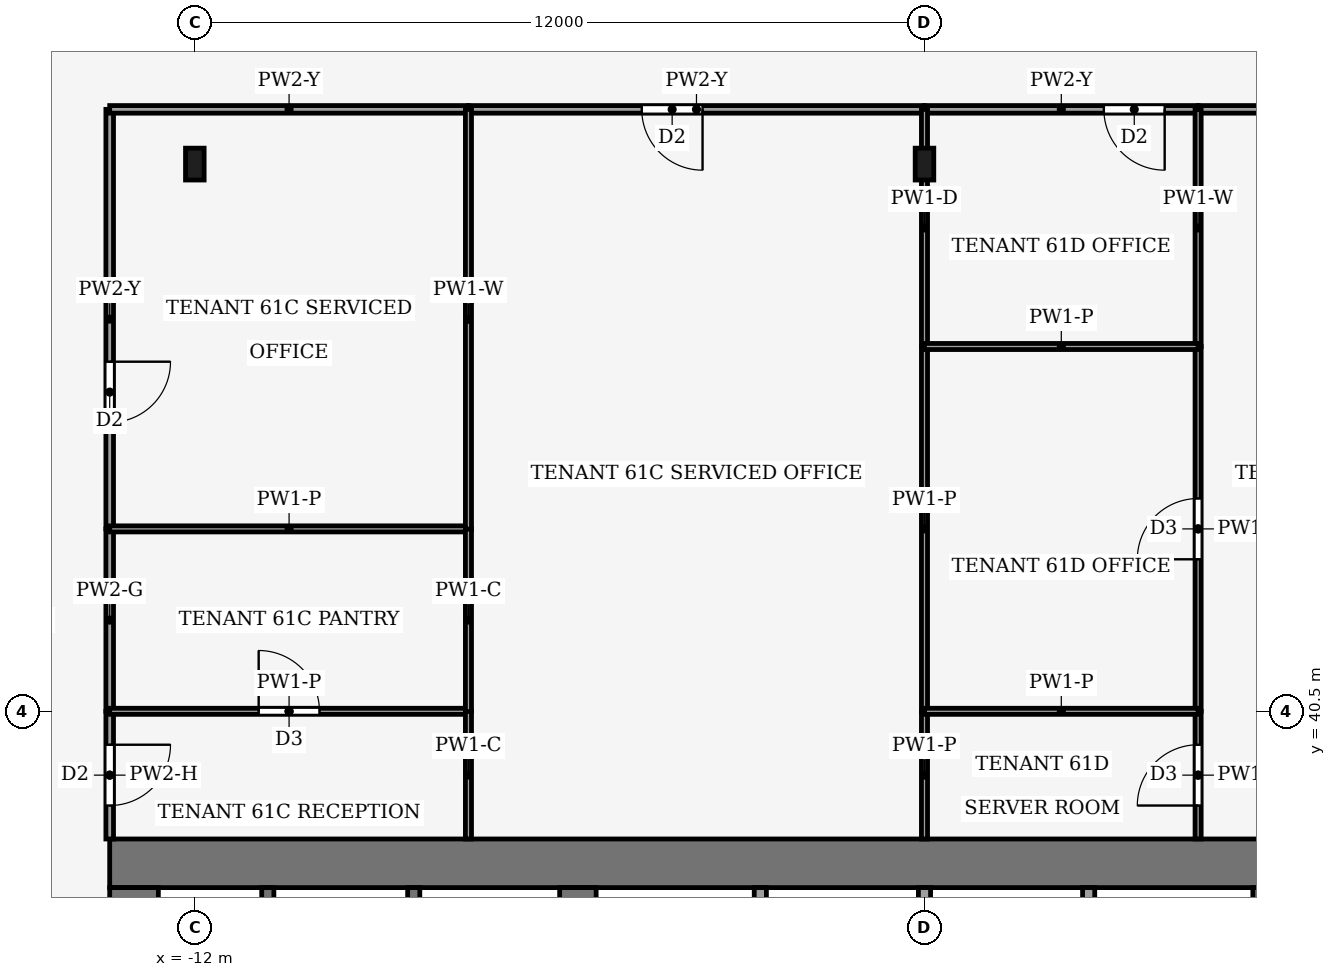
"""IFC4 building model, lengths in metres.
Left out: names, types, materials, properties, quantities, classifications, styles, units other than length and angle.
Written with IfcOpenShell. Run it as: python <this file> out.ifc"""

import sys

from ifc_helpers import new_model, si_unit, direction, frame, frame_2d, origin, origin_2d, place, context, subcontext, project, spatial, rectangle, i_section, extrude, element, fill, save


model = new_model("IFC4")
c1 = context("Model", 3, precision=1e-05, world=origin(), true_north=direction((0.0, 1.0)))
c2 = subcontext(c1, "Body", "Model", "MODEL_VIEW")
j1 = project(units=[si_unit("LENGTHUNIT", "METRE"), si_unit("PLANEANGLEUNIT", "RADIAN")], contexts=[c1])
p1 = place(None, origin())
s1 = spatial("IfcSite", under=j1, at=p1, CompositionType="ELEMENT")
p2 = place(p1, origin())
s2 = spatial("IfcBuilding", under=s1, at=p2, CompositionType="ELEMENT")
p3 = place(p2, frame((0.0, 0.0, 266.0)))
s3 = spatial("IfcBuildingStorey", under=s2, at=p3, CompositionType="ELEMENT", Elevation=266.0)
p4 = place(p3, frame((-13.4, 38.0, -0.13), z_axis=(0.0, 0.0, 1.0), x_axis=(1.0, 0.0, 0.0)))
e1 = element("IfcWall", 1, at=p4, inside=s3, PredefinedType="SHEAR", context=c2, shape_type="SweptSolid", body=[
    extrude(rectangle(XDim=26.8, YDim=0.8, at=frame_2d((13.4, 0.0))), origin(), (0.0, 0.0, 1.0), 4.0),
])
p5 = place(p3, frame((-13.0, 18.4, -0.13), z_axis=(0.0, 0.0, 1.0), x_axis=(0.0, 1.0, 0.0)))
e2 = element("IfcWall", 2, at=p5, inside=s3, PredefinedType="SHEAR", context=c2, shape_type="SweptSolid", body=[
    extrude(rectangle(XDim=19.2, YDim=0.8, at=frame_2d((9.6, 0.0))), origin(), (0.0, 0.0, 1.0), 4.0),
])
p6 = place(p5, frame((2.8, 0.0, 0.13)))
e3 = element("IfcOpeningElement", 3, at=p6, cuts=e2, PredefinedType="OPENING", context=c2, shape_type="SweptSolid", body=[
    extrude(rectangle(XDim=2.4, YDim=2.4, at=frame_2d((1.2, 1.2))), frame((0.0, 0.41, 0.0), z_axis=(0.0, -1.0, 0.0), x_axis=(1.0, 0.0, 0.0)), (0.0, 0.0, 1.0), 0.82),
])
p7 = place(p5, frame((13.4, 0.0, 0.13)))
e4 = element("IfcOpeningElement", 4, at=p7, cuts=e2, PredefinedType="OPENING", context=c2, shape_type="SweptSolid", body=[
    extrude(rectangle(XDim=1.4, YDim=2.2, at=frame_2d((0.7, 1.1))), frame((0.0, 0.41, 0.0), z_axis=(0.0, -1.0, 0.0), x_axis=(1.0, 0.0, 0.0)), (0.0, 0.0, 1.0), 0.82),
])
p8 = place(p3, frame((-5.7, 18.4, -0.13), z_axis=(0.0, 0.0, 1.0), x_axis=(0.0, 1.0, 0.0)))
e5 = element("IfcWall", 5, at=p8, inside=s3, PredefinedType="SHEAR", context=c2, shape_type="SweptSolid", body=[
    extrude(rectangle(XDim=19.2, YDim=0.6, at=frame_2d((9.6, 0.0))), origin(), (0.0, 0.0, 1.0), 4.0),
])
p9 = place(p8, frame((8.35, 0.0, 0.13)))
e6 = element("IfcOpeningElement", 6, at=p9, cuts=e5, PredefinedType="OPENING", context=c2, shape_type="SweptSolid", body=[
    extrude(rectangle(XDim=0.9, YDim=2.1, at=frame_2d((0.45, 1.05))), frame((0.0, 0.31, 0.0), z_axis=(0.0, -1.0, 0.0), x_axis=(1.0, 0.0, 0.0)), (0.0, 0.0, 1.0), 0.62),
])
p10 = place(p3, frame((5.7, 18.4, -0.13), z_axis=(0.0, 0.0, 1.0), x_axis=(0.0, 1.0, 0.0)))
e7 = element("IfcWall", 7, at=p10, inside=s3, PredefinedType="SHEAR", context=c2, shape_type="SweptSolid", body=[
    extrude(rectangle(XDim=19.2, YDim=0.6, at=frame_2d((9.6, 0.0))), origin(), (0.0, 0.0, 1.0), 4.0),
])
p11 = place(p10, frame((13.3, 0.0, 0.13)))
e8 = element("IfcOpeningElement", 8, at=p11, cuts=e7, PredefinedType="OPENING", context=c2, shape_type="SweptSolid", body=[
    extrude(rectangle(XDim=2.4, YDim=2.4, at=frame_2d((1.2, 1.2))), frame((0.0, 0.31, 0.0), z_axis=(0.0, -1.0, 0.0), x_axis=(1.0, 0.0, 0.0)), (0.0, 0.0, 1.0), 0.62),
])
for number, where, z_axis, x_axis in (
    (9, (-12.0, 49.5, 0.0), (0.0, 0.0, 1.0), (1.0, 0.0, 0.0)),
    (10, (0.0, 49.5, 0.0), (0.0, 0.0, 1.0), (1.0, 0.0, 0.0)),
):
    element("IfcColumn", number, at=place(p3, frame(where, z_axis=z_axis, x_axis=x_axis)), inside=s3, PredefinedType="COLUMN", context=c2, shape_type="SweptSolid", body=[
        extrude(i_section(OverallWidth=0.306, OverallDepth=0.524, WebThickness=0.012, FlangeThickness=0.04, FilletRadius=0.027, at=origin_2d()), origin(), (0.0, 0.0, 1.0), 4.0),
    ])
for number, where, z_axis, x_axis in (
    (11, (-10.8, 34.0, 0.0), (0.0, 0.0, 1.0), (0.0, 1.0, 0.0)),
    (12, (-8.4, 34.0, 0.0), (0.0, 0.0, 1.0), (0.0, 1.0, 0.0)),
    (13, (-2.7, 34.0, 0.0), (0.0, 0.0, 1.0), (0.0, 1.0, 0.0)),
    (14, (0.0, 34.0, 0.0), (0.0, 0.0, 1.0), (0.0, 1.0, 0.0)),
    (15, (2.7, 34.0, 0.0), (0.0, 0.0, 1.0), (0.0, 1.0, 0.0)),
):
    element("IfcWall", number, at=place(p3, frame(where, z_axis=z_axis, x_axis=x_axis)), inside=s3, PredefinedType="PARTITIONING", context=c2, shape_type="SweptSolid", body=[
        extrude(rectangle(XDim=3.6, YDim=0.2, at=frame_2d((1.8, 0.0))), origin(), (0.0, 0.0, 1.0), 3.87),
    ])
p12 = place(p3, frame((-13.4, 40.5, 0.0), z_axis=(0.0, 0.0, 1.0), x_axis=(0.0, -1.0, 0.0)))
e16 = element("IfcWall", 16, at=p12, inside=s3, PredefinedType="PARTITIONING", context=c2, shape_type="SweptSolid", body=[
    extrude(rectangle(XDim=2.1, YDim=0.125, at=frame_2d((1.05, 0.0))), origin(), (0.0, 0.0, 1.0), 3.14),
])
p13 = place(p12, frame((0.55, 0.0, 0.0)))
e17 = element("IfcOpeningElement", 17, at=p13, cuts=e16, PredefinedType="OPENING", context=c2, shape_type="SweptSolid", body=[
    extrude(rectangle(XDim=1.0, YDim=2.1, at=frame_2d((0.5, 1.05))), frame((0.0, 0.073, 0.0), z_axis=(0.0, -1.0, 0.0), x_axis=(1.0, 0.0, 0.0)), (0.0, 0.0, 1.0), 0.145),
])
p14 = place(p3, frame((-13.4, 40.5, 0.0), z_axis=(0.0, 0.0, 1.0), x_axis=(0.0, 1.0, 0.0)))
e18 = element("IfcWall", 18, at=p14, inside=s3, PredefinedType="PARTITIONING", context=c2, shape_type="SweptSolid", body=[
    extrude(rectangle(XDim=3.0, YDim=0.125, at=frame_2d((1.5, 0.0))), origin(), (0.0, 0.0, 1.0), 3.87),
])
p15 = place(p3, frame((-13.4, 50.4, 0.0), z_axis=(0.0, 0.0, 1.0), x_axis=(0.0, -1.0, 0.0)))
e19 = element("IfcWall", 19, at=p15, inside=s3, PredefinedType="PARTITIONING", context=c2, shape_type="SweptSolid", body=[
    extrude(rectangle(XDim=6.9, YDim=0.125, at=frame_2d((3.45, 0.0))), origin(), (0.0, 0.0, 1.0), 3.24),
])
p16 = place(p15, frame((4.15, 0.0, 0.0)))
e20 = element("IfcOpeningElement", 20, at=p16, cuts=e19, PredefinedType="OPENING", context=c2, shape_type="SweptSolid", body=[
    extrude(rectangle(XDim=1.0, YDim=2.1, at=frame_2d((0.5, 1.05))), frame((0.0, 0.073, 0.0), z_axis=(0.0, -1.0, 0.0), x_axis=(1.0, 0.0, 0.0)), (0.0, 0.0, 1.0), 0.145),
])
p17 = place(p3, frame((-7.5, 50.4, 0.0), z_axis=(0.0, 0.0, 1.0), x_axis=(-1.0, 0.0, 0.0)))
e21 = element("IfcWall", 21, at=p17, inside=s3, PredefinedType="PARTITIONING", context=c2, shape_type="SweptSolid", body=[
    extrude(rectangle(XDim=5.9, YDim=0.125, at=frame_2d((2.95, 0.0))), origin(), (0.0, 0.0, 1.0), 3.24),
])
p18 = place(p3, frame((0.0, 50.4, 0.0), z_axis=(0.0, 0.0, 1.0), x_axis=(-1.0, 0.0, 0.0)))
e22 = element("IfcWall", 22, at=p18, inside=s3, PredefinedType="PARTITIONING", context=c2, shape_type="SweptSolid", body=[
    extrude(rectangle(XDim=7.5, YDim=0.125, at=frame_2d((3.75, 0.0))), origin(), (0.0, 0.0, 1.0), 3.24),
])
p19 = place(p18, frame((3.65, 0.0, 0.0)))
e23 = element("IfcOpeningElement", 23, at=p19, cuts=e22, PredefinedType="OPENING", context=c2, shape_type="SweptSolid", body=[
    extrude(rectangle(XDim=1.0, YDim=2.1, at=frame_2d((0.5, 1.05))), frame((0.0, 0.073, 0.0), z_axis=(0.0, -1.0, 0.0), x_axis=(1.0, 0.0, 0.0)), (0.0, 0.0, 1.0), 0.145),
])
p20 = place(p3, frame((10.4, 50.4, 0.0), z_axis=(0.0, 0.0, 1.0), x_axis=(-1.0, 0.0, 0.0)))
e24 = element("IfcWall", 24, at=p20, inside=s3, PredefinedType="PARTITIONING", context=c2, shape_type="SweptSolid", body=[
    extrude(rectangle(XDim=5.9, YDim=0.125, at=frame_2d((2.95, 0.0))), origin(), (0.0, 0.0, 1.0), 3.24),
])
p21 = place(p20, frame((2.45, 0.0, 0.0)))
e25 = element("IfcOpeningElement", 25, at=p21, cuts=e24, PredefinedType="OPENING", context=c2, shape_type="SweptSolid", body=[
    extrude(rectangle(XDim=1.0, YDim=2.1, at=frame_2d((0.5, 1.05))), frame((0.0, 0.073, 0.0), z_axis=(0.0, -1.0, 0.0), x_axis=(1.0, 0.0, 0.0)), (0.0, 0.0, 1.0), 0.145),
])
p22 = place(p3, frame((4.5, 50.4, 0.0), z_axis=(0.0, 0.0, 1.0), x_axis=(-1.0, 0.0, 0.0)))
e26 = element("IfcWall", 26, at=p22, inside=s3, PredefinedType="PARTITIONING", context=c2, shape_type="SweptSolid", body=[
    extrude(rectangle(XDim=4.5, YDim=0.125, at=frame_2d((2.25, 0.0))), origin(), (0.0, 0.0, 1.0), 3.24),
])
p23 = place(p22, frame((0.55, 0.0, 0.0)))
e27 = element("IfcOpeningElement", 27, at=p23, cuts=e26, PredefinedType="OPENING", context=c2, shape_type="SweptSolid", body=[
    extrude(rectangle(XDim=1.0, YDim=2.1, at=frame_2d((0.5, 1.05))), frame((0.0, 0.073, 0.0), z_axis=(0.0, -1.0, 0.0), x_axis=(1.0, 0.0, 0.0)), (0.0, 0.0, 1.0), 0.145),
])
p24 = place(p3, frame((-13.4, 40.5, 0.0), z_axis=(0.0, 0.0, 1.0), x_axis=(1.0, 0.0, 0.0)))
e28 = element("IfcWall", 28, at=p24, inside=s3, PredefinedType="PARTITIONING", context=c2, shape_type="SweptSolid", body=[
    extrude(rectangle(XDim=5.9, YDim=0.1, at=frame_2d((2.95, 0.0))), origin(), (0.0, 0.0, 1.0), 3.44),
])
p25 = place(p24, frame((2.45, 0.0, 0.0)))
e29 = element("IfcOpeningElement", 29, at=p25, cuts=e28, PredefinedType="OPENING", context=c2, shape_type="SweptSolid", body=[
    extrude(rectangle(XDim=1.0, YDim=2.1, at=frame_2d((0.5, 1.05))), frame((0.0, 0.06, 0.0), z_axis=(0.0, -1.0, 0.0), x_axis=(1.0, 0.0, 0.0)), (0.0, 0.0, 1.0), 0.12),
])
p26 = place(p3, frame((-7.5, 38.4, 0.0), z_axis=(0.0, 0.0, 1.0), x_axis=(0.0, 1.0, 0.0)))
e30 = element("IfcWall", 30, at=p26, inside=s3, PredefinedType="PARTITIONING", context=c2, shape_type="SweptSolid", body=[
    extrude(rectangle(XDim=2.104, YDim=0.1, at=frame_2d((1.052, 0.0))), origin(), (0.0, 0.0, 1.0), 3.87),
])
p27 = place(p3, frame((-7.5, 43.5, 0.0), z_axis=(0.0, 0.0, 1.0), x_axis=(-1.0, 0.0, 0.0)))
e31 = element("IfcWall", 31, at=p27, inside=s3, PredefinedType="PARTITIONING", context=c2, shape_type="SweptSolid", body=[
    extrude(rectangle(XDim=5.9, YDim=0.1, at=frame_2d((2.95, 0.0))), origin(), (0.0, 0.0, 1.0), 3.44),
])
p28 = place(p3, frame((-7.5, 40.496, 0.0), z_axis=(0.0, 0.0, 1.0), x_axis=(0.0, 1.0, 0.0)))
e32 = element("IfcWall", 32, at=p28, inside=s3, PredefinedType="PARTITIONING", context=c2, shape_type="SweptSolid", body=[
    extrude(rectangle(XDim=3.008, YDim=0.1, at=frame_2d((1.504, 0.0))), origin(), (0.0, 0.0, 1.0), 3.87),
])
p29 = place(p3, frame((-7.5, 43.496, 0.0), z_axis=(0.0, 0.0, 1.0), x_axis=(0.0, 1.0, 0.0)))
e33 = element("IfcWall", 33, at=p29, inside=s3, PredefinedType="PARTITIONING", context=c2, shape_type="SweptSolid", body=[
    extrude(rectangle(XDim=6.904, YDim=0.1, at=frame_2d((3.452, 0.0))), origin(), (0.0, 0.0, 1.0), 3.24),
])
p30 = place(p3, frame((0.0, 38.4, 0.0), z_axis=(0.0, 0.0, 1.0), x_axis=(0.0, 1.0, 0.0)))
e34 = element("IfcWall", 34, at=p30, inside=s3, PredefinedType="PARTITIONING", context=c2, shape_type="SweptSolid", body=[
    extrude(rectangle(XDim=2.1, YDim=0.1, at=frame_2d((1.05, 0.0))), origin(), (0.0, 0.0, 1.0), 3.44),
])
p31 = place(p3, frame((0.0, 40.5, 0.0), z_axis=(0.0, 0.0, 1.0), x_axis=(0.0, 1.0, 0.0)))
e35 = element("IfcWall", 35, at=p31, inside=s3, PredefinedType="PARTITIONING", context=c2, shape_type="SweptSolid", body=[
    extrude(rectangle(XDim=6.0, YDim=0.1, at=frame_2d((3.0, 0.0))), origin(), (0.0, 0.0, 1.0), 3.44),
])
p32 = place(p3, frame((0.0, 46.5, 0.0), z_axis=(0.0, 0.0, 1.0), x_axis=(0.0, 1.0, 0.0)))
e36 = element("IfcWall", 36, at=p32, inside=s3, PredefinedType="PARTITIONING", context=c2, shape_type="SweptSolid", body=[
    extrude(rectangle(XDim=3.9, YDim=0.1, at=frame_2d((1.95, 0.0))), origin(), (0.0, 0.0, 1.0), 3.29),
])
p33 = place(p3, frame((4.5, 38.4, 0.0), z_axis=(0.0, 0.0, 1.0), x_axis=(0.0, 1.0, 0.0)))
e37 = element("IfcWall", 37, at=p33, inside=s3, PredefinedType="PARTITIONING", context=c2, shape_type="SweptSolid", body=[
    extrude(rectangle(XDim=2.1, YDim=0.1, at=frame_2d((1.05, 0.0))), origin(), (0.0, 0.0, 1.0), 3.87),
])
p34 = place(p33, frame((0.55, 0.0, 0.0)))
e38 = element("IfcOpeningElement", 38, at=p34, cuts=e37, PredefinedType="OPENING", context=c2, shape_type="SweptSolid", body=[
    extrude(rectangle(XDim=1.0, YDim=2.1, at=frame_2d((0.5, 1.05))), frame((0.0, 0.06, 0.0), z_axis=(0.0, -1.0, 0.0), x_axis=(1.0, 0.0, 0.0)), (0.0, 0.0, 1.0), 0.12),
])
p35 = place(p3, frame((4.5, 40.5, 0.0), z_axis=(0.0, 0.0, 1.0), x_axis=(0.0, 1.0, 0.0)))
e39 = element("IfcWall", 39, at=p35, inside=s3, PredefinedType="PARTITIONING", context=c2, shape_type="SweptSolid", body=[
    extrude(rectangle(XDim=6.0, YDim=0.1, at=frame_2d((3.0, 0.0))), origin(), (0.0, 0.0, 1.0), 3.87),
])
p36 = place(p35, frame((2.5, 0.0, 0.0)))
e40 = element("IfcOpeningElement", 40, at=p36, cuts=e39, PredefinedType="OPENING", context=c2, shape_type="SweptSolid", body=[
    extrude(rectangle(XDim=1.0, YDim=2.1, at=frame_2d((0.5, 1.05))), frame((0.0, 0.06, 0.0), z_axis=(0.0, -1.0, 0.0), x_axis=(1.0, 0.0, 0.0)), (0.0, 0.0, 1.0), 0.12),
])
p37 = place(p3, frame((4.5, 50.4, 0.0), z_axis=(0.0, 0.0, 1.0), x_axis=(0.0, -1.0, 0.0)))
e41 = element("IfcWall", 41, at=p37, inside=s3, PredefinedType="PARTITIONING", context=c2, shape_type="SweptSolid", body=[
    extrude(rectangle(XDim=3.9, YDim=0.1, at=frame_2d((1.95, 0.0))), origin(), (0.0, 0.0, 1.0), 3.24),
])
for number, where, z_axis, x_axis in (
    (42, (4.5, 40.5, 0.0), (0.0, 0.0, 1.0), (-1.0, 0.0, 0.0)),
    (43, (4.5, 46.5, 0.0), (0.0, 0.0, 1.0), (-1.0, 0.0, 0.0)),
):
    element("IfcWall", number, at=place(p3, frame(where, z_axis=z_axis, x_axis=x_axis)), inside=s3, PredefinedType="PARTITIONING", context=c2, shape_type="SweptSolid", body=[
        extrude(rectangle(XDim=4.5, YDim=0.1, at=frame_2d((2.25, 0.0))), origin(), (0.0, 0.0, 1.0), 3.44),
    ])
p38 = place(p13, origin())
e44 = element("IfcDoor", 44, at=p38, inside=s3, OperationType="SINGLE_SWING_RIGHT", PredefinedType="DOOR", context=c2, shape_type="SweptSolid", body=[
    extrude(rectangle(XDim=1.0, YDim=2.1, at=frame_2d((0.5, 1.05))), frame((0.0, 0.025, 0.0), z_axis=(0.0, -1.0, 0.0), x_axis=(1.0, 0.0, 0.0)), (0.0, 0.0, 1.0), 0.05),
])
fill(e17, e44)
p39 = place(p16, origin())
e45 = element("IfcDoor", 45, at=p39, inside=s3, OperationType="SINGLE_SWING_RIGHT", PredefinedType="DOOR", context=c2, shape_type="SweptSolid", body=[
    extrude(rectangle(XDim=1.0, YDim=2.1, at=frame_2d((0.5, 1.05))), frame((0.0, 0.025, 0.0), z_axis=(0.0, -1.0, 0.0), x_axis=(1.0, 0.0, 0.0)), (0.0, 0.0, 1.0), 0.05),
])
fill(e20, e45)
p40 = place(p19, origin())
e46 = element("IfcDoor", 46, at=p40, inside=s3, OperationType="SINGLE_SWING_RIGHT", PredefinedType="DOOR", context=c2, shape_type="SweptSolid", body=[
    extrude(rectangle(XDim=1.0, YDim=2.1, at=frame_2d((0.5, 1.05))), frame((0.0, 0.025, 0.0), z_axis=(0.0, -1.0, 0.0), x_axis=(1.0, 0.0, 0.0)), (0.0, 0.0, 1.0), 0.05),
])
fill(e23, e46)
p41 = place(p23, origin())
e47 = element("IfcDoor", 47, at=p41, inside=s3, OperationType="SINGLE_SWING_LEFT", PredefinedType="DOOR", context=c2, shape_type="SweptSolid", body=[
    extrude(rectangle(XDim=1.0, YDim=2.1, at=frame_2d((0.5, 1.05))), frame((0.0, 0.025, 0.0), z_axis=(0.0, -1.0, 0.0), x_axis=(1.0, 0.0, 0.0)), (0.0, 0.0, 1.0), 0.05),
])
fill(e27, e47)
p42 = place(p25, origin())
e48 = element("IfcDoor", 48, at=p42, inside=s3, OperationType="SINGLE_SWING_LEFT", PredefinedType="DOOR", context=c2, shape_type="SweptSolid", body=[
    extrude(rectangle(XDim=1.0, YDim=2.1, at=frame_2d((0.5, 1.05))), frame((0.0, 0.025, 0.0), z_axis=(0.0, -1.0, 0.0), x_axis=(1.0, 0.0, 0.0)), (0.0, 0.0, 1.0), 0.05),
])
fill(e29, e48)
p43 = place(p34, origin())
e49 = element("IfcDoor", 49, at=p43, inside=s3, OperationType="SINGLE_SWING_RIGHT", PredefinedType="DOOR", context=c2, shape_type="SweptSolid", body=[
    extrude(rectangle(XDim=1.0, YDim=2.1, at=frame_2d((0.5, 1.05))), frame((0.0, 0.025, 0.0), z_axis=(0.0, -1.0, 0.0), x_axis=(1.0, 0.0, 0.0)), (0.0, 0.0, 1.0), 0.05),
])
fill(e38, e49)
p44 = place(p36, origin())
e50 = element("IfcDoor", 50, at=p44, inside=s3, OperationType="SINGLE_SWING_LEFT", PredefinedType="DOOR", context=c2, shape_type="SweptSolid", body=[
    extrude(rectangle(XDim=1.0, YDim=2.1, at=frame_2d((0.5, 1.05))), frame((0.0, 0.025, 0.0), z_axis=(0.0, -1.0, 0.0), x_axis=(1.0, 0.0, 0.0)), (0.0, 0.0, 1.0), 0.05),
])
fill(e40, e50)
save(model, sys.argv[1])
